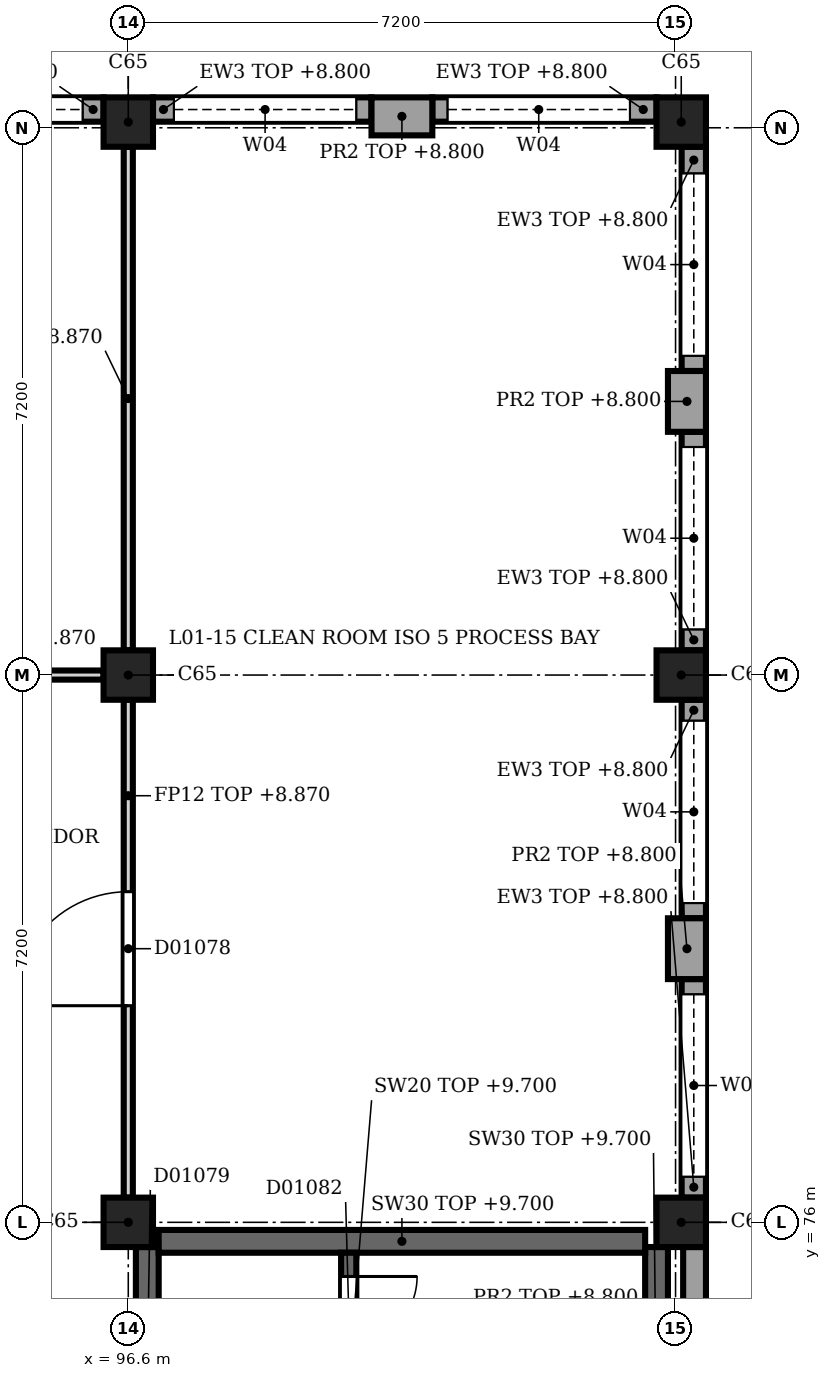
"""IFC4 building model, lengths in metres.
Left out: names, types, materials, properties, quantities, classifications, styles, units other than length and angle.
Written with IfcOpenShell. Run it as: python <this file> out.ifc"""

import sys

from ifc_helpers import new_model, si_unit, direction, frame, frame_2d, origin, origin_2d, place, context, subcontext, project, spatial, rectangle, extrude, element, fill, save


model = new_model("IFC4")
c1 = context("Model", 3, precision=1e-05, world=origin(), true_north=direction((0.0, 1.0)))
c2 = subcontext(c1, "Body", "Model", "MODEL_VIEW")
j1 = project(units=[si_unit("LENGTHUNIT", "METRE"), si_unit("PLANEANGLEUNIT", "RADIAN")], contexts=[c1])
p1 = place(None, origin())
s1 = spatial("IfcSite", under=j1, at=p1, CompositionType="ELEMENT")
p2 = place(p1, origin())
s2 = spatial("IfcBuilding", under=s1, at=p2, CompositionType="ELEMENT")
p3 = place(p2, frame((0.0, 0.0, 5.4)))
s3 = spatial("IfcBuildingStorey", under=s2, at=p3, CompositionType="ELEMENT", Elevation=5.4)
for number, where, z_axis, x_axis in (
    (1, (96.6, 76.0, 0.0), (0.0, 0.0, 1.0), (1.0, 0.0, 0.0)),
    (2, (96.6, 83.2, 0.0), (0.0, 0.0, 1.0), (1.0, 0.0, 0.0)),
    (3, (96.6, 90.475, 0.0), (0.0, 0.0, 1.0), (1.0, 0.0, 0.0)),
    (4, (103.875, 76.0, 0.0), (0.0, 0.0, 1.0), (1.0, 0.0, 0.0)),
    (5, (103.875, 83.2, 0.0), (0.0, 0.0, 1.0), (1.0, 0.0, 0.0)),
    (6, (103.875, 90.475, 0.0), (0.0, 0.0, 1.0), (1.0, 0.0, 0.0)),
):
    element("IfcColumn", number, at=place(p3, frame(where, z_axis=z_axis, x_axis=x_axis)), inside=s3, PredefinedType="COLUMN", context=c2, shape_type="SweptSolid", body=[
        extrude(rectangle(XDim=0.65, YDim=0.65, at=origin_2d()), origin(), (0.0, 0.0, 1.0), 4.5),
    ])
p4 = place(p3, frame((99.8, 90.55, 0.0), z_axis=(0.0, 0.0, 1.0), x_axis=(1.0, 0.0, 0.0)))
e7 = element("IfcWall", 7, at=p4, inside=s3, PredefinedType="SOLIDWALL", context=c2, shape_type="SweptSolid", body=[
    extrude(rectangle(XDim=0.8, YDim=0.5, at=frame_2d((0.4, 0.0))), origin(), (0.0, 0.0, 1.0), 3.4),
])
p5 = place(p3, frame((93.4, 90.64, 0.0), z_axis=(0.0, 0.0, 1.0), x_axis=(1.0, 0.0, 0.0)))
e8 = element("IfcWall", 8, at=p5, inside=s3, PredefinedType="SOLIDWALL", context=c2, shape_type="SweptSolid", body=[
    extrude(rectangle(XDim=2.875, YDim=0.32, at=frame_2d((1.438, 0.0))), origin(), (0.0, 0.0, 1.0), 3.4),
])
p6 = place(p5, frame((0.2, 0.0, 1.9)))
e9 = element("IfcOpeningElement", 9, at=p6, cuts=e8, PredefinedType="OPENING", context=c2, shape_type="SweptSolid", body=[
    extrude(rectangle(XDim=2.4, YDim=1.2, at=frame_2d((1.2, 0.6))), frame((0.0, 0.17, 0.0), z_axis=(0.0, -1.0, 0.0), x_axis=(1.0, 0.0, 0.0)), (0.0, 0.0, 1.0), 0.34),
])
p7 = place(p3, frame((96.925, 90.64, 0.0), z_axis=(0.0, 0.0, 1.0), x_axis=(1.0, 0.0, 0.0)))
e10 = element("IfcWall", 10, at=p7, inside=s3, PredefinedType="SOLIDWALL", context=c2, shape_type="SweptSolid", body=[
    extrude(rectangle(XDim=2.875, YDim=0.32, at=frame_2d((1.438, 0.0))), origin(), (0.0, 0.0, 1.0), 3.4),
])
p8 = place(p7, frame((0.275, 0.0, 1.9)))
e11 = element("IfcOpeningElement", 11, at=p8, cuts=e10, PredefinedType="OPENING", context=c2, shape_type="SweptSolid", body=[
    extrude(rectangle(XDim=2.4, YDim=1.2, at=frame_2d((1.2, 0.6))), frame((0.0, 0.17, 0.0), z_axis=(0.0, -1.0, 0.0), x_axis=(1.0, 0.0, 0.0)), (0.0, 0.0, 1.0), 0.34),
])
p9 = place(p3, frame((100.6, 90.64, 0.0), z_axis=(0.0, 0.0, 1.0), x_axis=(1.0, 0.0, 0.0)))
e12 = element("IfcWall", 12, at=p9, inside=s3, PredefinedType="SOLIDWALL", context=c2, shape_type="SweptSolid", body=[
    extrude(rectangle(XDim=2.95, YDim=0.32, at=frame_2d((1.475, 0.0))), origin(), (0.0, 0.0, 1.0), 3.4),
])
p10 = place(p9, frame((0.2, 0.0, 1.9)))
e13 = element("IfcOpeningElement", 13, at=p10, cuts=e12, PredefinedType="OPENING", context=c2, shape_type="SweptSolid", body=[
    extrude(rectangle(XDim=2.4, YDim=1.2, at=frame_2d((1.2, 0.6))), frame((0.0, 0.17, 0.0), z_axis=(0.0, -1.0, 0.0), x_axis=(1.0, 0.0, 0.0)), (0.0, 0.0, 1.0), 0.34),
])
for number, where, z_axis, x_axis in (
    (14, (103.95, 87.2, 0.0), (0.0, 0.0, 1.0), (0.0, -1.0, 0.0)),
    (15, (103.95, 80.0, 0.0), (0.0, 0.0, 1.0), (0.0, -1.0, 0.0)),
):
    element("IfcWall", number, at=place(p3, frame(where, z_axis=z_axis, x_axis=x_axis)), inside=s3, PredefinedType="SOLIDWALL", context=c2, shape_type="SweptSolid", body=[
        extrude(rectangle(XDim=0.8, YDim=0.5, at=frame_2d((0.4, 0.0))), origin(), (0.0, 0.0, 1.0), 3.4),
    ])
p11 = place(p3, frame((104.04, 90.15, 0.0), z_axis=(0.0, 0.0, 1.0), x_axis=(0.0, -1.0, 0.0)))
e16 = element("IfcWall", 16, at=p11, inside=s3, PredefinedType="SOLIDWALL", context=c2, shape_type="SweptSolid", body=[
    extrude(rectangle(XDim=2.95, YDim=0.32, at=frame_2d((1.475, 0.0))), origin(), (0.0, 0.0, 1.0), 3.4),
])
p12 = place(p11, frame((0.35, 0.0, 1.9)))
e17 = element("IfcOpeningElement", 17, at=p12, cuts=e16, PredefinedType="OPENING", context=c2, shape_type="SweptSolid", body=[
    extrude(rectangle(XDim=2.4, YDim=1.2, at=frame_2d((1.2, 0.6))), frame((0.0, 0.17, 0.0), z_axis=(0.0, -1.0, 0.0), x_axis=(1.0, 0.0, 0.0)), (0.0, 0.0, 1.0), 0.34),
])
p13 = place(p3, frame((104.04, 86.4, 0.0), z_axis=(0.0, 0.0, 1.0), x_axis=(0.0, -1.0, 0.0)))
e18 = element("IfcWall", 18, at=p13, inside=s3, PredefinedType="SOLIDWALL", context=c2, shape_type="SweptSolid", body=[
    extrude(rectangle(XDim=2.875, YDim=0.32, at=frame_2d((1.438, 0.0))), origin(), (0.0, 0.0, 1.0), 3.4),
])
p14 = place(p13, frame((0.2, 0.0, 1.9)))
e19 = element("IfcOpeningElement", 19, at=p14, cuts=e18, PredefinedType="OPENING", context=c2, shape_type="SweptSolid", body=[
    extrude(rectangle(XDim=2.4, YDim=1.2, at=frame_2d((1.2, 0.6))), frame((0.0, 0.17, 0.0), z_axis=(0.0, -1.0, 0.0), x_axis=(1.0, 0.0, 0.0)), (0.0, 0.0, 1.0), 0.34),
])
p15 = place(p3, frame((104.04, 82.875, 0.0), z_axis=(0.0, 0.0, 1.0), x_axis=(0.0, -1.0, 0.0)))
e20 = element("IfcWall", 20, at=p15, inside=s3, PredefinedType="SOLIDWALL", context=c2, shape_type="SweptSolid", body=[
    extrude(rectangle(XDim=2.875, YDim=0.32, at=frame_2d((1.438, 0.0))), origin(), (0.0, 0.0, 1.0), 3.4),
])
p16 = place(p15, frame((0.275, 0.0, 1.9)))
e21 = element("IfcOpeningElement", 21, at=p16, cuts=e20, PredefinedType="OPENING", context=c2, shape_type="SweptSolid", body=[
    extrude(rectangle(XDim=2.4, YDim=1.2, at=frame_2d((1.2, 0.6))), frame((0.0, 0.17, 0.0), z_axis=(0.0, -1.0, 0.0), x_axis=(1.0, 0.0, 0.0)), (0.0, 0.0, 1.0), 0.34),
])
p17 = place(p3, frame((104.04, 79.2, 0.0), z_axis=(0.0, 0.0, 1.0), x_axis=(0.0, -1.0, 0.0)))
e22 = element("IfcWall", 22, at=p17, inside=s3, PredefinedType="SOLIDWALL", context=c2, shape_type="SweptSolid", body=[
    extrude(rectangle(XDim=2.875, YDim=0.32, at=frame_2d((1.438, 0.0))), origin(), (0.0, 0.0, 1.0), 3.4),
])
p18 = place(p17, frame((0.2, 0.0, 1.9)))
e23 = element("IfcOpeningElement", 23, at=p18, cuts=e22, PredefinedType="OPENING", context=c2, shape_type="SweptSolid", body=[
    extrude(rectangle(XDim=2.4, YDim=1.2, at=frame_2d((1.2, 0.6))), frame((0.0, 0.17, 0.0), z_axis=(0.0, -1.0, 0.0), x_axis=(1.0, 0.0, 0.0)), (0.0, 0.0, 1.0), 0.34),
])
p19 = place(p3, frame((104.05, 75.675, 0.0), z_axis=(0.0, 0.0, 1.0), x_axis=(0.0, -1.0, 0.0)))
e24 = element("IfcWall", 24, at=p19, inside=s3, PredefinedType="SOLIDWALL", context=c2, shape_type="SweptSolid", body=[
    extrude(rectangle(XDim=2.875, YDim=0.3, at=frame_2d((1.438, 0.0))), origin(), (0.0, 0.0, 1.0), 3.4),
])
p20 = place(p3, frame((96.85, 75.675, 0.0), z_axis=(0.0, 0.0, 1.0), x_axis=(0.0, -1.0, 0.0)))
e25 = element("IfcWall", 25, at=p20, inside=s3, PredefinedType="SHEAR", context=c2, shape_type="SweptSolid", body=[
    extrude(rectangle(XDim=6.625, YDim=0.3, at=frame_2d((3.312, 0.0))), origin(), (0.0, 0.0, 1.0), 4.3),
])
p21 = place(p20, frame((1.075, 0.0, 0.0)))
e26 = element("IfcOpeningElement", 26, at=p21, cuts=e25, PredefinedType="OPENING", context=c2, shape_type="SweptSolid", body=[
    extrude(rectangle(XDim=1.2, YDim=2.1, at=frame_2d((0.6, 1.05))), frame((0.0, 0.16, 0.0), z_axis=(0.0, -1.0, 0.0), x_axis=(1.0, 0.0, 0.0)), (0.0, 0.0, 1.0), 0.32),
])
p22 = place(p3, frame((103.55, 69.05, 0.0), z_axis=(0.0, 0.0, 1.0), x_axis=(0.0, 1.0, 0.0)))
e27 = element("IfcWall", 27, at=p22, inside=s3, PredefinedType="SHEAR", context=c2, shape_type="SweptSolid", body=[
    extrude(rectangle(XDim=6.625, YDim=0.3, at=frame_2d((3.312, 0.0))), origin(), (0.0, 0.0, 1.0), 4.3),
])
p23 = place(p22, frame((1.25, 0.0, 1.2)))
e28 = element("IfcOpeningElement", 28, at=p23, cuts=e27, PredefinedType="OPENING", context=c2, shape_type="SweptSolid", body=[
    extrude(rectangle(XDim=0.6, YDim=1.8, at=frame_2d((0.3, 0.9))), frame((0.0, 0.16, 0.0), z_axis=(0.0, -1.0, 0.0), x_axis=(1.0, 0.0, 0.0)), (0.0, 0.0, 1.0), 0.32),
])
p24 = place(p3, frame((97.0, 75.75, 0.0), z_axis=(0.0, 0.0, 1.0), x_axis=(1.0, 0.0, 0.0)))
e29 = element("IfcWall", 29, at=p24, inside=s3, PredefinedType="SHEAR", context=c2, shape_type="SweptSolid", body=[
    extrude(rectangle(XDim=6.4, YDim=0.3, at=frame_2d((3.2, 0.0))), origin(), (0.0, 0.0, 1.0), 4.3),
])
p25 = place(p3, frame((99.5, 72.35, 0.0), z_axis=(0.0, 0.0, 1.0), x_axis=(0.0, 1.0, 0.0)))
e30 = element("IfcWall", 30, at=p25, inside=s3, PredefinedType="SHEAR", context=c2, shape_type="SweptSolid", body=[
    extrude(rectangle(XDim=3.25, YDim=0.2, at=frame_2d((1.625, 0.0))), origin(), (0.0, 0.0, 1.0), 4.3),
])
p26 = place(p25, frame((0.312, 0.0, 0.0)))
e31 = element("IfcOpeningElement", 31, at=p26, cuts=e30, PredefinedType="OPENING", context=c2, shape_type="SweptSolid", body=[
    extrude(rectangle(XDim=0.9, YDim=2.1, at=frame_2d((0.45, 1.05))), frame((0.0, 0.11, 0.0), z_axis=(0.0, -1.0, 0.0), x_axis=(1.0, 0.0, 0.0)), (0.0, 0.0, 1.0), 0.22),
])
p27 = place(p25, frame((2.038, 0.0, 0.0)))
e32 = element("IfcOpeningElement", 32, at=p27, cuts=e30, PredefinedType="OPENING", context=c2, shape_type="SweptSolid", body=[
    extrude(rectangle(XDim=0.9, YDim=2.1, at=frame_2d((0.45, 1.05))), frame((0.0, 0.11, 0.0), z_axis=(0.0, -1.0, 0.0), x_axis=(1.0, 0.0, 0.0)), (0.0, 0.0, 1.0), 0.22),
])
p28 = place(p3, frame((89.725, 83.2, 0.0), z_axis=(0.0, 0.0, 1.0), x_axis=(1.0, 0.0, 0.0)))
e33 = element("IfcWall", 33, at=p28, inside=s3, PredefinedType="PARTITIONING", context=c2, shape_type="SweptSolid", body=[
    extrude(rectangle(XDim=6.55, YDim=0.12, at=frame_2d((3.275, 0.0))), origin(), (0.0, 0.0, 1.0), 3.47),
])
p29 = place(p28, frame((2.525, 0.0, 0.0)))
e34 = element("IfcOpeningElement", 34, at=p29, cuts=e33, PredefinedType="OPENING", context=c2, shape_type="SweptSolid", body=[
    extrude(rectangle(XDim=1.5, YDim=2.1, at=frame_2d((0.75, 1.05))), frame((0.0, 0.07, 0.0), z_axis=(0.0, -1.0, 0.0), x_axis=(1.0, 0.0, 0.0)), (0.0, 0.0, 1.0), 0.14),
])
p30 = place(p3, frame((96.6, 82.875, 0.0), z_axis=(0.0, 0.0, 1.0), x_axis=(0.0, -1.0, 0.0)))
e35 = element("IfcWall", 35, at=p30, inside=s3, PredefinedType="PARTITIONING", context=c2, shape_type="SweptSolid", body=[
    extrude(rectangle(XDim=6.55, YDim=0.12, at=frame_2d((3.275, 0.0))), origin(), (0.0, 0.0, 1.0), 3.47),
])
p31 = place(p30, frame((2.525, 0.0, 0.0)))
e36 = element("IfcOpeningElement", 36, at=p31, cuts=e35, PredefinedType="OPENING", context=c2, shape_type="SweptSolid", body=[
    extrude(rectangle(XDim=1.5, YDim=2.2, at=frame_2d((0.75, 1.1))), frame((0.0, 0.07, 0.0), z_axis=(0.0, -1.0, 0.0), x_axis=(1.0, 0.0, 0.0)), (0.0, 0.0, 1.0), 0.14),
])
p32 = place(p3, frame((96.6, 83.525, 0.0), z_axis=(0.0, 0.0, 1.0), x_axis=(0.0, 1.0, 0.0)))
e37 = element("IfcWall", 37, at=p32, inside=s3, PredefinedType="PARTITIONING", context=c2, shape_type="SweptSolid", body=[
    extrude(rectangle(XDim=6.625, YDim=0.12, at=frame_2d((3.312, 0.0))), origin(), (0.0, 0.0, 1.0), 3.47),
])
p33 = place(p6, origin())
e38 = element("IfcWindow", 38, at=p33, inside=s3, PartitioningType="SINGLE_PANEL", PredefinedType="WINDOW", context=c2, shape_type="SweptSolid", body=[
    extrude(rectangle(XDim=2.4, YDim=1.2, at=frame_2d((1.2, 0.6))), frame((0.0, 0.03, 0.0), z_axis=(0.0, -1.0, 0.0), x_axis=(1.0, 0.0, 0.0)), (0.0, 0.0, 1.0), 0.06),
])
fill(e9, e38)
p34 = place(p8, origin())
e39 = element("IfcWindow", 39, at=p34, inside=s3, PartitioningType="SINGLE_PANEL", PredefinedType="WINDOW", context=c2, shape_type="SweptSolid", body=[
    extrude(rectangle(XDim=2.4, YDim=1.2, at=frame_2d((1.2, 0.6))), frame((0.0, 0.03, 0.0), z_axis=(0.0, -1.0, 0.0), x_axis=(1.0, 0.0, 0.0)), (0.0, 0.0, 1.0), 0.06),
])
fill(e11, e39)
p35 = place(p10, origin())
e40 = element("IfcWindow", 40, at=p35, inside=s3, PartitioningType="SINGLE_PANEL", PredefinedType="WINDOW", context=c2, shape_type="SweptSolid", body=[
    extrude(rectangle(XDim=2.4, YDim=1.2, at=frame_2d((1.2, 0.6))), frame((0.0, 0.03, 0.0), z_axis=(0.0, -1.0, 0.0), x_axis=(1.0, 0.0, 0.0)), (0.0, 0.0, 1.0), 0.06),
])
fill(e13, e40)
p36 = place(p12, origin())
e41 = element("IfcWindow", 41, at=p36, inside=s3, PartitioningType="SINGLE_PANEL", PredefinedType="WINDOW", context=c2, shape_type="SweptSolid", body=[
    extrude(rectangle(XDim=2.4, YDim=1.2, at=frame_2d((1.2, 0.6))), frame((0.0, 0.03, 0.0), z_axis=(0.0, -1.0, 0.0), x_axis=(1.0, 0.0, 0.0)), (0.0, 0.0, 1.0), 0.06),
])
fill(e17, e41)
p37 = place(p14, origin())
e42 = element("IfcWindow", 42, at=p37, inside=s3, PartitioningType="SINGLE_PANEL", PredefinedType="WINDOW", context=c2, shape_type="SweptSolid", body=[
    extrude(rectangle(XDim=2.4, YDim=1.2, at=frame_2d((1.2, 0.6))), frame((0.0, 0.03, 0.0), z_axis=(0.0, -1.0, 0.0), x_axis=(1.0, 0.0, 0.0)), (0.0, 0.0, 1.0), 0.06),
])
fill(e19, e42)
p38 = place(p16, origin())
e43 = element("IfcWindow", 43, at=p38, inside=s3, PartitioningType="SINGLE_PANEL", PredefinedType="WINDOW", context=c2, shape_type="SweptSolid", body=[
    extrude(rectangle(XDim=2.4, YDim=1.2, at=frame_2d((1.2, 0.6))), frame((0.0, 0.03, 0.0), z_axis=(0.0, -1.0, 0.0), x_axis=(1.0, 0.0, 0.0)), (0.0, 0.0, 1.0), 0.06),
])
fill(e21, e43)
p39 = place(p18, origin())
e44 = element("IfcWindow", 44, at=p39, inside=s3, PartitioningType="SINGLE_PANEL", PredefinedType="WINDOW", context=c2, shape_type="SweptSolid", body=[
    extrude(rectangle(XDim=2.4, YDim=1.2, at=frame_2d((1.2, 0.6))), frame((0.0, 0.03, 0.0), z_axis=(0.0, -1.0, 0.0), x_axis=(1.0, 0.0, 0.0)), (0.0, 0.0, 1.0), 0.06),
])
fill(e23, e44)
p40 = place(p27, origin())
e45 = element("IfcDoor", 45, at=p40, inside=s3, OperationType="SINGLE_SWING_RIGHT", PredefinedType="DOOR", context=c2, shape_type="SweptSolid", body=[
    extrude(rectangle(XDim=0.9, YDim=2.1, at=frame_2d((0.45, 1.05))), frame((0.0, 0.025, 0.0), z_axis=(0.0, -1.0, 0.0), x_axis=(1.0, 0.0, 0.0)), (0.0, 0.0, 1.0), 0.05),
])
fill(e32, e45)
p41 = place(p31, origin())
e46 = element("IfcDoor", 46, at=p41, inside=s3, OperationType="SINGLE_SWING_RIGHT", PredefinedType="DOOR", context=c2, shape_type="SweptSolid", body=[
    extrude(rectangle(XDim=1.5, YDim=2.2, at=frame_2d((0.75, 1.1))), frame((0.0, 0.025, 0.0), z_axis=(0.0, -1.0, 0.0), x_axis=(1.0, 0.0, 0.0)), (0.0, 0.0, 1.0), 0.05),
])
fill(e36, e46)
save(model, sys.argv[1])
